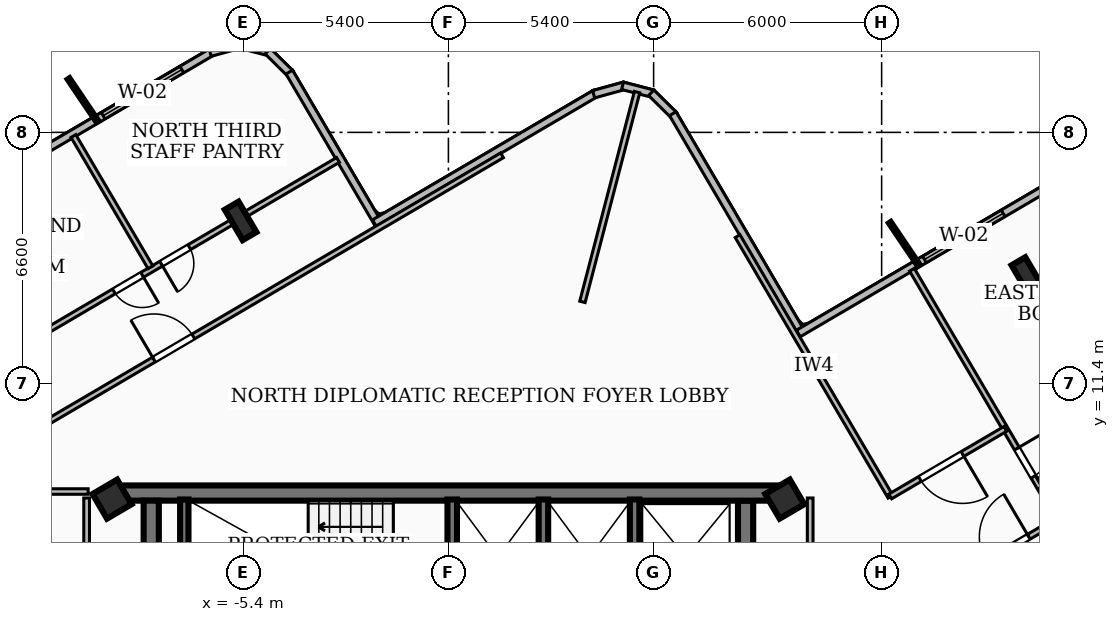
"""IFC4 building model, lengths in metres.
Left out: names, types, materials, properties, quantities, classifications, styles, units other than length and angle.
Written with IfcOpenShell. Run it as: python <this file> out.ifc"""

import sys

from ifc_helpers import new_model, si_unit, direction, frame, frame_2d, origin, origin_2d, place, context, subcontext, project, spatial, rectangle, i_section, extrude, element, fill, save


model = new_model("IFC4")
c1 = context("Model", 3, precision=1e-05, world=origin(), true_north=direction((0.0, 1.0)))
c2 = subcontext(c1, "Body", "Model", "MODEL_VIEW")
j1 = project(units=[si_unit("LENGTHUNIT", "METRE"), si_unit("PLANEANGLEUNIT", "RADIAN")], contexts=[c1])
p1 = place(None, origin())
s1 = spatial("IfcSite", under=j1, at=p1, CompositionType="ELEMENT")
p2 = place(p1, origin())
s2 = spatial("IfcBuilding", under=s1, at=p2, CompositionType="ELEMENT")
p3 = place(p2, frame((0.0, 0.0, 208.62)))
s3 = spatial("IfcBuildingStorey", under=s2, at=p3, CompositionType="ELEMENT", Elevation=208.62)
p4 = place(p3, frame((-8.78, 8.51, 0.0), z_axis=(0.0, 0.0, 1.0), x_axis=(1.0, 0.0, 0.0)))
e1 = element("IfcWall", 1, at=p4, inside=s3, PredefinedType="SHEAR", context=c2, shape_type="SweptSolid", body=[
    extrude(rectangle(XDim=17.56, YDim=0.4, at=frame_2d((8.78, 0.0))), origin(), (0.0, 0.0, 1.0), 3.16),
])
for number, where, z_axis, x_axis in (
    (2, (-7.82, 1.95, 0.0), (0.0, 0.0, 1.0), (0.0, 1.0, 0.0)),
    (3, (7.82, 8.31, 0.0), (0.0, 0.0, 1.0), (0.0, -1.0, 0.0)),
):
    element("IfcWall", number, at=place(p3, frame(where, z_axis=z_axis, x_axis=x_axis)), inside=s3, PredefinedType="SHEAR", context=c2, shape_type="SweptSolid", body=[
        extrude(rectangle(XDim=6.36, YDim=0.4, at=frame_2d((3.18, 0.0))), origin(), (0.0, 0.0, 1.0), 3.16),
    ])
p5 = place(p3, frame((-6.95, 5.28, 0.0), z_axis=(0.0, 0.0, 1.0), x_axis=(0.0, 1.0, 0.0)))
e4 = element("IfcWall", 4, at=p5, inside=s3, PredefinedType="SOLIDWALL", context=c2, shape_type="SweptSolid", body=[
    extrude(rectangle(XDim=3.06, YDim=0.22, at=frame_2d((1.53, 0.0))), origin(), (0.0, 0.0, 1.0), 3.16),
])
for number, where, z_axis, x_axis in (
    (5, (0.1, 5.3, 0.0), (0.0, 0.0, 1.0), (0.0, 1.0, 0.0)),
    (6, (2.5, 5.3, 0.0), (0.0, 0.0, 1.0), (0.0, 1.0, 0.0)),
    (7, (4.9, 5.3, 0.0), (0.0, 0.0, 1.0), (0.0, 1.0, 0.0)),
):
    element("IfcWall", number, at=place(p3, frame(where, z_axis=z_axis, x_axis=x_axis)), inside=s3, PredefinedType="SOLIDWALL", context=c2, shape_type="SweptSolid", body=[
        extrude(rectangle(XDim=3.04, YDim=0.25, at=frame_2d((1.52, 0.0))), origin(), (0.0, 0.0, 1.0), 3.16),
    ])
for number, where, z_axis, x_axis in (
    (8, (-8.85, 8.35, 0.0), (0.0, 0.0, 1.0), (0.863, 0.506, 0.0)),
    (9, (8.85, 8.35, 0.0), (0.0, 0.0, 1.0), (0.863, 0.506, 0.0)),
):
    element("IfcColumn", number, at=place(p3, frame(where, z_axis=z_axis, x_axis=x_axis)), inside=s3, PredefinedType="COLUMN", context=c2, shape_type="SweptSolid", body=[
        extrude(rectangle(XDim=0.75, YDim=0.75, at=origin_2d()), origin(), (0.0, 0.0, 1.0), 3.42),
    ])
for number, where, z_axis, x_axis in (
    (10, (15.234, 14.209, 0.0), (0.0, 0.0, 1.0), (0.863, 0.506, 0.0)),
    (11, (-5.468, 15.671, 0.0), (0.0, 0.0, 1.0), (0.863, 0.506, 0.0)),
):
    element("IfcColumn", number, at=place(p3, frame(where, z_axis=z_axis, x_axis=x_axis)), inside=s3, PredefinedType="COLUMN", context=c2, shape_type="SweptSolid", body=[
        extrude(i_section(OverallWidth=0.418, OverallDepth=0.927, WebThickness=0.019, FlangeThickness=0.032, at=origin_2d()), origin(), (0.0, 0.0, 1.0), 3.42),
    ])
p6 = place(p3, frame((-14.524, 15.246, 0.0), z_axis=(0.0, 0.0, 1.0), x_axis=(0.862483422861, 0.506085314241, 0.0)))
e12 = element("IfcWall", 12, at=p6, inside=s3, PredefinedType="SOLIDWALL", context=c2, shape_type="SweptSolid", body=[
    extrude(rectangle(XDim=9.625, YDim=0.2, at=frame_2d((4.812, 0.0))), origin(), (0.0, 0.0, 1.0), 3.16),
])
p7 = place(p6, frame((6.307, 0.0, 0.85)))
e13 = element("IfcOpeningElement", 13, at=p7, cuts=e12, PredefinedType="OPENING", context=c2, shape_type="SweptSolid", body=[
    extrude(rectangle(XDim=2.4, YDim=2.1, at=frame_2d((1.2, 1.05))), frame((0.0, 0.11, 0.0), z_axis=(0.0, -1.0, 0.0), x_axis=(1.0, 0.0, 0.0)), (0.0, 0.0, 1.0), 0.22),
])
p8 = place(p3, frame((-6.269, 20.097, 0.0), z_axis=(0.0, 0.0, 1.0), x_axis=(0.963925656212, 0.266171616247, 0.0)))
e14 = element("IfcWall", 14, at=p8, inside=s3, PredefinedType="SOLIDWALL", context=c2, shape_type="SweptSolid", body=[
    extrude(rectangle(XDim=0.838, YDim=0.2, at=frame_2d((0.419, 0.0))), origin(), (0.0, 0.0, 1.0), 3.16),
])
p9 = place(p3, frame((-5.509, 20.319, 0.0), z_axis=(0.0, 0.0, 1.0), x_axis=(0.967962254737, -0.251095745493, 0.0)))
e15 = element("IfcWall", 15, at=p9, inside=s3, PredefinedType="SOLIDWALL", context=c2, shape_type="SweptSolid", body=[
    extrude(rectangle(XDim=0.824, YDim=0.2, at=frame_2d((0.412, 0.0))), origin(), (0.0, 0.0, 1.0), 3.16),
])
p10 = place(p3, frame((-4.753, 20.136, 0.0), z_axis=(0.0, 0.0, 1.0), x_axis=(0.711167178618, -0.70302293281, 0.0)))
e16 = element("IfcWall", 16, at=p10, inside=s3, PredefinedType="SOLIDWALL", context=c2, shape_type="SweptSolid", body=[
    extrude(rectangle(XDim=0.839, YDim=0.2, at=frame_2d((0.42, 0.0))), origin(), (0.0, 0.0, 1.0), 3.16),
])
p11 = place(p3, frame((-4.187, 19.586, 0.0), z_axis=(0.0, 0.0, 1.0), x_axis=(0.505936854923, -0.862570518178, 0.0)))
e17 = element("IfcWall", 17, at=p11, inside=s3, PredefinedType="SOLIDWALL", context=c2, shape_type="SweptSolid", body=[
    extrude(rectangle(XDim=4.641, YDim=0.2, at=frame_2d((2.32, 0.0))), origin(), (0.0, 0.0, 1.0), 3.16),
])
p12 = place(p3, frame((-1.948, 15.612, 0.0), z_axis=(0.0, 0.0, 1.0), x_axis=(0.86259717351, 0.505891407569, 0.0)))
e18 = element("IfcWall", 18, at=p12, inside=s3, PredefinedType="SOLIDWALL", context=c2, shape_type="SweptSolid", body=[
    extrude(rectangle(XDim=6.742, YDim=0.2, at=frame_2d((3.371, 0.0))), origin(), (0.0, 0.0, 1.0), 3.16),
])
p13 = place(p3, frame((3.822, 19.003, 0.0), z_axis=(0.0, 0.0, 1.0), x_axis=(0.963905015631, 0.266246353668, 0.0)))
e19 = element("IfcWall", 19, at=p13, inside=s3, PredefinedType="SOLIDWALL", context=c2, shape_type="SweptSolid", body=[
    extrude(rectangle(XDim=0.838, YDim=0.2, at=frame_2d((0.419, 0.0))), origin(), (0.0, 0.0, 1.0), 3.16),
])
p14 = place(p3, frame((4.582, 19.225, 0.0), z_axis=(0.0, 0.0, 1.0), x_axis=(0.967943577658, -0.251167733737, 0.0)))
e20 = element("IfcWall", 20, at=p14, inside=s3, PredefinedType="SOLIDWALL", context=c2, shape_type="SweptSolid", body=[
    extrude(rectangle(XDim=0.824, YDim=0.2, at=frame_2d((0.412, 0.0))), origin(), (0.0, 0.0, 1.0), 3.16),
])
p15 = place(p3, frame((5.338, 19.042, 0.0), z_axis=(0.0, 0.0, 1.0), x_axis=(0.711310891957, -0.702877524881, 0.0)))
e21 = element("IfcWall", 21, at=p15, inside=s3, PredefinedType="SOLIDWALL", context=c2, shape_type="SweptSolid", body=[
    extrude(rectangle(XDim=0.84, YDim=0.2, at=frame_2d((0.42, 0.0))), origin(), (0.0, 0.0, 1.0), 3.16),
])
p16 = place(p3, frame((5.904, 18.492, 0.0), z_axis=(0.0, 0.0, 1.0), x_axis=(0.506017844805, -0.862523008817, 0.0)))
e22 = element("IfcWall", 22, at=p16, inside=s3, PredefinedType="SOLIDWALL", context=c2, shape_type="SweptSolid", body=[
    extrude(rectangle(XDim=6.741, YDim=0.2, at=frame_2d((3.37, 0.0))), origin(), (0.0, 0.0, 1.0), 3.16),
])
p17 = place(p3, frame((9.206, 12.707, 0.0), z_axis=(0.0, 0.0, 1.0), x_axis=(0.862602827395, 0.505881766988, 0.0)))
e23 = element("IfcWall", 23, at=p17, inside=s3, PredefinedType="SOLIDWALL", context=c2, shape_type="SweptSolid", body=[
    extrude(rectangle(XDim=8.842, YDim=0.2, at=frame_2d((4.421, 0.0))), origin(), (0.0, 0.0, 1.0), 3.16),
])
p18 = place(p17, frame((3.85, 0.0, 0.85)))
e24 = element("IfcOpeningElement", 24, at=p18, cuts=e23, PredefinedType="OPENING", context=c2, shape_type="SweptSolid", body=[
    extrude(rectangle(XDim=2.4, YDim=2.1, at=frame_2d((1.2, 1.05))), frame((0.0, 0.11, 0.0), z_axis=(0.0, -1.0, 0.0), x_axis=(1.0, 0.0, 0.0)), (0.0, 0.0, 1.0), 0.22),
])
p19 = place(p3, frame((-9.52, 1.75, 0.0), z_axis=(0.0, 0.0, 1.0), x_axis=(0.0, 1.0, 0.0)))
e25 = element("IfcWall", 25, at=p19, inside=s3, PredefinedType="PARTITIONING", context=c2, shape_type="SweptSolid", body=[
    extrude(rectangle(XDim=6.63, YDim=0.15, at=frame_2d((3.315, 0.0))), origin(), (0.0, 0.0, 1.0), 3.16),
])
p20 = place(p3, frame((9.52, 1.75, 0.0), z_axis=(0.0, 0.0, 1.0), x_axis=(0.0, 1.0, 0.0)))
e26 = element("IfcWall", 26, at=p20, inside=s3, PredefinedType="PARTITIONING", context=c2, shape_type="SweptSolid", body=[
    extrude(rectangle(XDim=6.63, YDim=0.15, at=frame_2d((3.315, 0.0))), origin(), (0.0, 0.0, 1.0), 2.53),
])
p21 = place(p3, frame((-13.854, 8.55, 0.0), z_axis=(0.0, 0.0, 1.0), x_axis=(1.0, 0.0, 0.0)))
e27 = element("IfcWall", 27, at=p21, inside=s3, PredefinedType="PARTITIONING", context=c2, shape_type="SweptSolid", body=[
    extrude(rectangle(XDim=4.374, YDim=0.145, at=frame_2d((2.187, 0.0))), origin(), (0.0, 0.0, 1.0), 2.53),
])
p22 = place(p3, frame((3.527, 13.54, 0.0), z_axis=(0.0, 0.0, 1.0), x_axis=(0.252132617321, 0.967692690519, 0.0)))
e28 = element("IfcWall", 28, at=p22, inside=s3, PredefinedType="PARTITIONING", context=c2, shape_type="SweptSolid", body=[
    extrude(rectangle(XDim=5.703, YDim=0.145, at=frame_2d((2.852, 0.0))), origin(), (0.0, 0.0, 1.0), 3.16),
])
p23 = place(p3, frame((11.632, 8.413, 0.0), z_axis=(0.0, 0.0, 1.0), x_axis=(-0.506057561451, 0.862499706955, 0.0)))
e29 = element("IfcWall", 29, at=p23, inside=s3, PredefinedType="PARTITIONING", context=c2, shape_type="SweptSolid", body=[
    extrude(rectangle(XDim=7.95, YDim=0.145, at=frame_2d((3.975, 0.0))), origin(), (0.0, 0.0, 1.0), 2.53),
])
p24 = place(p3, frame((14.654, 10.198, 0.0), z_axis=(0.0, 0.0, 1.0), x_axis=(-0.862375516706, -0.506269165747, 0.0)))
e30 = element("IfcWall", 30, at=p24, inside=s3, PredefinedType="PARTITIONING", context=c2, shape_type="SweptSolid", body=[
    extrude(rectangle(XDim=3.51, YDim=0.145, at=frame_2d((1.755, 0.0))), origin(), (0.0, 0.0, 1.0), 2.53),
])
p25 = place(p24, frame((1.305, 0.0, 0.0)))
e31 = element("IfcOpeningElement", 31, at=p25, cuts=e30, PredefinedType="OPENING", context=c2, shape_type="SweptSolid", body=[
    extrude(rectangle(XDim=1.3, YDim=2.1, at=frame_2d((0.65, 1.05))), frame((0.0, 0.083, 0.0), z_axis=(0.0, -1.0, 0.0), x_axis=(1.0, 0.0, 0.0)), (0.0, 0.0, 1.0), 0.165),
])
p26 = place(p3, frame((13.024, 6.041, 0.0), z_axis=(0.0, 0.0, 1.0), x_axis=(0.862527334663, 0.506010471195, 0.0)))
e32 = element("IfcWall", 32, at=p26, inside=s3, PredefinedType="PARTITIONING", context=c2, shape_type="SweptSolid", body=[
    extrude(rectangle(XDim=3.51, YDim=0.145, at=frame_2d((1.755, 0.0))), origin(), (0.0, 0.0, 1.0), 3.16),
])
p27 = place(p26, frame((1.305, 0.0, 0.0)))
e33 = element("IfcOpeningElement", 33, at=p27, cuts=e32, PredefinedType="OPENING", context=c2, shape_type="SweptSolid", body=[
    extrude(rectangle(XDim=1.3, YDim=2.1, at=frame_2d((0.65, 1.05))), frame((0.0, 0.083, 0.0), z_axis=(0.0, -1.0, 0.0), x_axis=(1.0, 0.0, 0.0)), (0.0, 0.0, 1.0), 0.165),
])
p28 = place(p3, frame((15.531, 8.822, 0.0), z_axis=(0.0, 0.0, 1.0), x_axis=(0.862494081005, 0.506067149923, 0.0)))
e34 = element("IfcWall", 34, at=p28, inside=s3, PredefinedType="PARTITIONING", context=c2, shape_type="SweptSolid", body=[
    extrude(rectangle(XDim=6.776, YDim=0.145, at=frame_2d((3.388, 0.0))), origin(), (0.0, 0.0, 1.0), 2.53),
])
p29 = place(p3, frame((12.198, 14.385, 0.0), z_axis=(0.0, 0.0, 1.0), x_axis=(0.506037527975, -0.862511460956, 0.0)))
e35 = element("IfcWall", 35, at=p29, inside=s3, PredefinedType="PARTITIONING", context=c2, shape_type="SweptSolid", body=[
    extrude(rectangle(XDim=12.469, YDim=0.145, at=frame_2d((6.235, 0.0))), origin(), (0.0, 0.0, 1.0), 2.53),
])
p30 = place(p29, frame((6.655, 0.0, 0.0)))
e36 = element("IfcOpeningElement", 36, at=p30, cuts=e35, PredefinedType="OPENING", context=c2, shape_type="SweptSolid", body=[
    extrude(rectangle(XDim=0.86, YDim=2.04, at=frame_2d((0.43, 1.02))), frame((0.0, 0.083, 0.0), z_axis=(0.0, -1.0, 0.0), x_axis=(1.0, 0.0, 0.0)), (0.0, 0.0, 1.0), 0.165),
])
p31 = place(p29, frame((5.455, 0.0, 0.0)))
e37 = element("IfcOpeningElement", 37, at=p31, cuts=e35, PredefinedType="OPENING", context=c2, shape_type="SweptSolid", body=[
    extrude(rectangle(XDim=0.86, YDim=2.04, at=frame_2d((0.43, 1.02))), frame((0.0, 0.083, 0.0), z_axis=(0.0, -1.0, 0.0), x_axis=(1.0, 0.0, 0.0)), (0.0, 0.0, 1.0), 0.165),
])
p32 = place(p3, frame((-15.873, 7.255, 0.0), z_axis=(0.0, 0.0, 1.0), x_axis=(0.862498672631, 0.506059324299, 0.0)))
e38 = element("IfcWall", 38, at=p32, inside=s3, PredefinedType="PARTITIONING", context=c2, shape_type="SweptSolid", body=[
    extrude(rectangle(XDim=20.039, YDim=0.145, at=frame_2d((10.02, 0.0))), origin(), (0.0, 0.0, 1.0), 2.53),
])
p33 = place(p32, frame((9.42, 0.0, 0.0)))
e39 = element("IfcOpeningElement", 39, at=p33, cuts=e38, PredefinedType="OPENING", context=c2, shape_type="SweptSolid", body=[
    extrude(rectangle(XDim=1.2, YDim=2.1, at=frame_2d((0.6, 1.05))), frame((0.0, 0.083, 0.0), z_axis=(0.0, -1.0, 0.0), x_axis=(1.0, 0.0, 0.0)), (0.0, 0.0, 1.0), 0.165),
])
p34 = place(p3, frame((-7.84, 14.449, 0.0), z_axis=(0.0, 0.0, 1.0), x_axis=(-0.505991637753, 0.862538383218, 0.0)))
e40 = element("IfcWall", 40, at=p34, inside=s3, PredefinedType="PARTITIONING", context=c2, shape_type="SweptSolid", body=[
    extrude(rectangle(XDim=4.006, YDim=0.145, at=frame_2d((2.003, 0.0))), origin(), (0.0, 0.0, 1.0), 3.16),
])
p35 = place(p3, frame((-2.906, 17.275, 0.0), z_axis=(0.0, 0.0, 1.0), x_axis=(-0.862505879614, -0.506047040927, 0.0)))
e41 = element("IfcWall", 41, at=p35, inside=s3, PredefinedType="PARTITIONING", context=c2, shape_type="SweptSolid", body=[
    extrude(rectangle(XDim=12.471, YDim=0.145, at=frame_2d((6.235, 0.0))), origin(), (0.0, 0.0, 1.0), 2.53),
])
p36 = place(p35, frame((4.535, 0.0, 0.0)))
e42 = element("IfcOpeningElement", 42, at=p36, cuts=e41, PredefinedType="OPENING", context=c2, shape_type="SweptSolid", body=[
    extrude(rectangle(XDim=0.86, YDim=2.04, at=frame_2d((0.43, 1.02))), frame((0.0, 0.083, 0.0), z_axis=(0.0, -1.0, 0.0), x_axis=(1.0, 0.0, 0.0)), (0.0, 0.0, 1.0), 0.165),
])
p37 = place(p35, frame((5.975, 0.0, 0.0)))
e43 = element("IfcOpeningElement", 43, at=p37, cuts=e41, PredefinedType="OPENING", context=c2, shape_type="SweptSolid", body=[
    extrude(rectangle(XDim=0.86, YDim=2.04, at=frame_2d((0.43, 1.02))), frame((0.0, 0.083, 0.0), z_axis=(0.0, -1.0, 0.0), x_axis=(1.0, 0.0, 0.0)), (0.0, 0.0, 1.0), 0.165),
])
p38 = place(p7, origin())
e44 = element("IfcWindow", 44, at=p38, inside=s3, PartitioningType="SINGLE_PANEL", PredefinedType="WINDOW", context=c2, shape_type="SweptSolid", body=[
    extrude(rectangle(XDim=2.4, YDim=2.1, at=frame_2d((1.2, 1.05))), frame((0.0, 0.03, 0.0), z_axis=(0.0, -1.0, 0.0), x_axis=(1.0, 0.0, 0.0)), (0.0, 0.0, 1.0), 0.06),
])
fill(e13, e44)
p39 = place(p18, origin())
e45 = element("IfcWindow", 45, at=p39, inside=s3, PartitioningType="SINGLE_PANEL", PredefinedType="WINDOW", context=c2, shape_type="SweptSolid", body=[
    extrude(rectangle(XDim=2.4, YDim=2.1, at=frame_2d((1.2, 1.05))), frame((0.0, 0.03, 0.0), z_axis=(0.0, -1.0, 0.0), x_axis=(1.0, 0.0, 0.0)), (0.0, 0.0, 1.0), 0.06),
])
fill(e24, e45)
p40 = place(p25, origin())
e46 = element("IfcDoor", 46, at=p40, inside=s3, OperationType="SINGLE_SWING_LEFT", PredefinedType="DOOR", context=c2, shape_type="SweptSolid", body=[
    extrude(rectangle(XDim=1.3, YDim=2.1, at=frame_2d((0.65, 1.05))), frame((0.0, 0.025, 0.0), z_axis=(0.0, -1.0, 0.0), x_axis=(1.0, 0.0, 0.0)), (0.0, 0.0, 1.0), 0.05),
])
fill(e31, e46)
p41 = place(p27, origin())
e47 = element("IfcDoor", 47, at=p41, inside=s3, OperationType="SINGLE_SWING_RIGHT", PredefinedType="DOOR", context=c2, shape_type="SweptSolid", body=[
    extrude(rectangle(XDim=1.3, YDim=2.1, at=frame_2d((0.65, 1.05))), frame((0.0, 0.025, 0.0), z_axis=(0.0, -1.0, 0.0), x_axis=(1.0, 0.0, 0.0)), (0.0, 0.0, 1.0), 0.05),
])
fill(e33, e47)
p42 = place(p30, origin())
e48 = element("IfcDoor", 48, at=p42, inside=s3, OperationType="SINGLE_SWING_RIGHT", PredefinedType="DOOR", context=c2, shape_type="SweptSolid", body=[
    extrude(rectangle(XDim=0.86, YDim=2.04, at=frame_2d((0.43, 1.02))), frame((0.0, 0.025, 0.0), z_axis=(0.0, -1.0, 0.0), x_axis=(1.0, 0.0, 0.0)), (0.0, 0.0, 1.0), 0.05),
])
fill(e36, e48)
p43 = place(p31, origin())
e49 = element("IfcDoor", 49, at=p43, inside=s3, OperationType="SINGLE_SWING_LEFT", PredefinedType="DOOR", context=c2, shape_type="SweptSolid", body=[
    extrude(rectangle(XDim=0.86, YDim=2.04, at=frame_2d((0.43, 1.02))), frame((0.0, 0.025, 0.0), z_axis=(0.0, -1.0, 0.0), x_axis=(1.0, 0.0, 0.0)), (0.0, 0.0, 1.0), 0.05),
])
fill(e37, e49)
p44 = place(p33, origin())
e50 = element("IfcDoor", 50, at=p44, inside=s3, OperationType="SINGLE_SWING_LEFT", PredefinedType="DOOR", context=c2, shape_type="SweptSolid", body=[
    extrude(rectangle(XDim=1.2, YDim=2.1, at=frame_2d((0.6, 1.05))), frame((0.0, 0.025, 0.0), z_axis=(0.0, -1.0, 0.0), x_axis=(1.0, 0.0, 0.0)), (0.0, 0.0, 1.0), 0.05),
])
fill(e39, e50)
p45 = place(p36, origin())
e51 = element("IfcDoor", 51, at=p45, inside=s3, OperationType="SINGLE_SWING_RIGHT", PredefinedType="DOOR", context=c2, shape_type="SweptSolid", body=[
    extrude(rectangle(XDim=0.86, YDim=2.04, at=frame_2d((0.43, 1.02))), frame((0.0, 0.025, 0.0), z_axis=(0.0, -1.0, 0.0), x_axis=(1.0, 0.0, 0.0)), (0.0, 0.0, 1.0), 0.05),
])
fill(e42, e51)
p46 = place(p37, origin())
e52 = element("IfcDoor", 52, at=p46, inside=s3, OperationType="SINGLE_SWING_LEFT", PredefinedType="DOOR", context=c2, shape_type="SweptSolid", body=[
    extrude(rectangle(XDim=0.86, YDim=2.04, at=frame_2d((0.43, 1.02))), frame((0.0, 0.025, 0.0), z_axis=(0.0, -1.0, 0.0), x_axis=(1.0, 0.0, 0.0)), (0.0, 0.0, 1.0), 0.05),
])
fill(e43, e52)
save(model, sys.argv[1])
